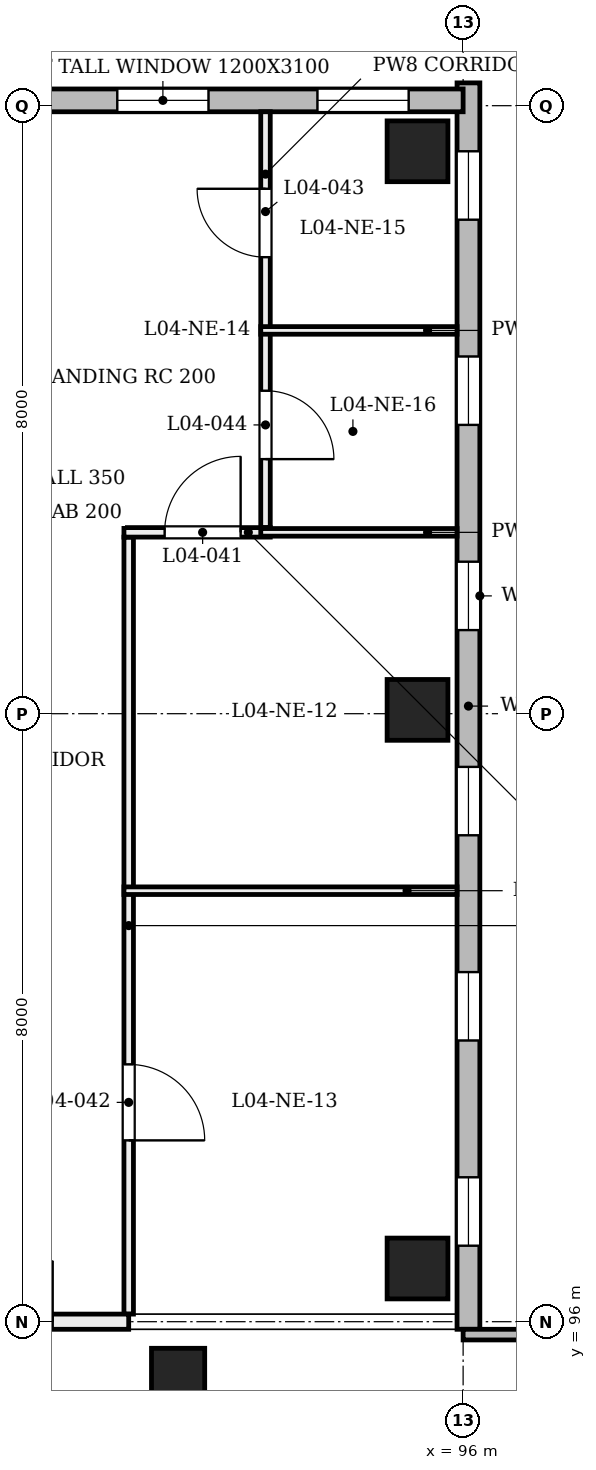
"""IFC4 building model, lengths in metres.
Left out: names, types, materials, properties, quantities, classifications, styles, units other than length and angle.
Written with IfcOpenShell. Run it as: python <this file> out.ifc"""

import sys

from ifc_helpers import new_model, si_unit, direction, frame, frame_2d, origin, origin_2d, place, context, subcontext, project, spatial, rectangle, extrude, element, fill, save


model = new_model("IFC4")
c1 = context("Model", 3, precision=1e-05, world=origin(), true_north=direction((0.0, 1.0)))
c2 = subcontext(c1, "Body", "Model", "MODEL_VIEW")
j1 = project(units=[si_unit("LENGTHUNIT", "METRE"), si_unit("PLANEANGLEUNIT", "RADIAN")], contexts=[c1])
p1 = place(None, origin())
s1 = spatial("IfcSite", under=j1, at=p1, CompositionType="ELEMENT")
p2 = place(p1, origin())
s2 = spatial("IfcBuilding", under=s1, at=p2, CompositionType="ELEMENT")
p3 = place(p2, frame((0.0, 0.0, 19.2)))
s3 = spatial("IfcBuildingStorey", under=s2, at=p3, CompositionType="ELEMENT", Elevation=19.2)
for number, where, z_axis, x_axis in (
    (1, (95.4, 96.7, 0.0), (0.0, 0.0, 1.0), (1.0, 0.0, 0.0)),
    (2, (95.4, 104.05, 0.0), (0.0, 0.0, 1.0), (1.0, 0.0, 0.0)),
    (3, (95.4, 111.4, 0.0), (0.0, 0.0, 1.0), (1.0, 0.0, 0.0)),
):
    element("IfcColumn", number, at=place(p3, frame(where, z_axis=z_axis, x_axis=x_axis)), inside=s3, PredefinedType="COLUMN", context=c2, shape_type="SweptSolid", body=[
        extrude(rectangle(XDim=0.8, YDim=0.8, at=origin_2d()), origin(), (0.0, 0.0, 1.0), 4.8),
    ])
p4 = place(p3, frame((92.0, 95.3, 0.0), z_axis=(0.203937582782, 0.0, 0.978983892783), x_axis=(0.0, 1.0, 0.0)))
e4 = element("IfcColumn", 4, at=p4, inside=s3, PredefinedType="COLUMN", context=c2, shape_type="SweptSolid", body=[
    extrude(rectangle(XDim=0.7, YDim=0.7, at=origin_2d()), origin(), (0.0, 0.0, 1.0), 4.678),
])
p5 = place(p3, frame((96.07, 95.9, 0.0), z_axis=(0.0, 0.0, 1.0), x_axis=(0.0, 1.0, 0.0)))
e5 = element("IfcWall", 5, at=p5, inside=s3, PredefinedType="SOLIDWALL", context=c2, shape_type="SweptSolid", body=[
    extrude(rectangle(XDim=16.4, YDim=0.3, at=frame_2d((8.2, 0.0))), origin(), (0.0, 0.0, 1.0), 3.9),
])
p6 = place(p5, frame((1.1, 0.0, 0.75)))
e6 = element("IfcOpeningElement", 6, at=p6, cuts=e5, PredefinedType="OPENING", context=c2, shape_type="SweptSolid", body=[
    extrude(rectangle(XDim=0.9, YDim=3.1, at=frame_2d((0.45, 1.55))), frame((0.0, 0.16, 0.0), z_axis=(0.0, -1.0, 0.0), x_axis=(1.0, 0.0, 0.0)), (0.0, 0.0, 1.0), 0.32),
])
p7 = place(p5, frame((3.8, 0.0, 0.75)))
e7 = element("IfcOpeningElement", 7, at=p7, cuts=e5, PredefinedType="OPENING", context=c2, shape_type="SweptSolid", body=[
    extrude(rectangle(XDim=0.9, YDim=3.1, at=frame_2d((0.45, 1.55))), frame((0.0, 0.16, 0.0), z_axis=(0.0, -1.0, 0.0), x_axis=(1.0, 0.0, 0.0)), (0.0, 0.0, 1.0), 0.32),
])
p8 = place(p5, frame((6.5, 0.0, 0.75)))
e8 = element("IfcOpeningElement", 8, at=p8, cuts=e5, PredefinedType="OPENING", context=c2, shape_type="SweptSolid", body=[
    extrude(rectangle(XDim=0.9, YDim=3.1, at=frame_2d((0.45, 1.55))), frame((0.0, 0.16, 0.0), z_axis=(0.0, -1.0, 0.0), x_axis=(1.0, 0.0, 0.0)), (0.0, 0.0, 1.0), 0.32),
])
p9 = place(p5, frame((9.2, 0.0, 0.75)))
e9 = element("IfcOpeningElement", 9, at=p9, cuts=e5, PredefinedType="OPENING", context=c2, shape_type="SweptSolid", body=[
    extrude(rectangle(XDim=0.9, YDim=3.1, at=frame_2d((0.45, 1.55))), frame((0.0, 0.16, 0.0), z_axis=(0.0, -1.0, 0.0), x_axis=(1.0, 0.0, 0.0)), (0.0, 0.0, 1.0), 0.32),
])
p10 = place(p5, frame((11.9, 0.0, 0.75)))
e10 = element("IfcOpeningElement", 10, at=p10, cuts=e5, PredefinedType="OPENING", context=c2, shape_type="SweptSolid", body=[
    extrude(rectangle(XDim=0.9, YDim=3.1, at=frame_2d((0.45, 1.55))), frame((0.0, 0.16, 0.0), z_axis=(0.0, -1.0, 0.0), x_axis=(1.0, 0.0, 0.0)), (0.0, 0.0, 1.0), 0.32),
])
p11 = place(p5, frame((14.6, 0.0, 0.75)))
e11 = element("IfcOpeningElement", 11, at=p11, cuts=e5, PredefinedType="OPENING", context=c2, shape_type="SweptSolid", body=[
    extrude(rectangle(XDim=0.9, YDim=3.1, at=frame_2d((0.45, 1.55))), frame((0.0, 0.16, 0.0), z_axis=(0.0, -1.0, 0.0), x_axis=(1.0, 0.0, 0.0)), (0.0, 0.0, 1.0), 0.32),
])
p12 = place(p3, frame((88.1, 112.07, 0.0), z_axis=(0.0, 0.0, 1.0), x_axis=(1.0, 0.0, 0.0)))
e12 = element("IfcWall", 12, at=p12, inside=s3, PredefinedType="SOLIDWALL", context=c2, shape_type="SweptSolid", body=[
    extrude(rectangle(XDim=7.9, YDim=0.3, at=frame_2d((3.95, 0.0))), origin(), (0.0, 0.0, 1.0), 3.9),
])
p13 = place(p12, frame((0.717, 0.0, 0.75)))
e13 = element("IfcOpeningElement", 13, at=p13, cuts=e12, PredefinedType="OPENING", context=c2, shape_type="SweptSolid", body=[
    extrude(rectangle(XDim=1.2, YDim=3.1, at=frame_2d((0.6, 1.55))), frame((0.0, 0.16, 0.0), z_axis=(0.0, -1.0, 0.0), x_axis=(1.0, 0.0, 0.0)), (0.0, 0.0, 1.0), 0.32),
])
p14 = place(p12, frame((3.35, 0.0, 0.75)))
e14 = element("IfcOpeningElement", 14, at=p14, cuts=e12, PredefinedType="OPENING", context=c2, shape_type="SweptSolid", body=[
    extrude(rectangle(XDim=1.2, YDim=3.1, at=frame_2d((0.6, 1.55))), frame((0.0, 0.16, 0.0), z_axis=(0.0, -1.0, 0.0), x_axis=(1.0, 0.0, 0.0)), (0.0, 0.0, 1.0), 0.32),
])
p15 = place(p12, frame((5.983, 0.0, 0.75)))
e15 = element("IfcOpeningElement", 15, at=p15, cuts=e12, PredefinedType="OPENING", context=c2, shape_type="SweptSolid", body=[
    extrude(rectangle(XDim=1.2, YDim=3.1, at=frame_2d((0.6, 1.55))), frame((0.0, 0.16, 0.0), z_axis=(0.0, -1.0, 0.0), x_axis=(1.0, 0.0, 0.0)), (0.0, 0.0, 1.0), 0.32),
])
p16 = place(p3, frame((96.0, 95.83, 0.0), z_axis=(0.0, 0.0, 1.0), x_axis=(1.0, 0.0, 0.0)))
e16 = element("IfcWall", 16, at=p16, inside=s3, PredefinedType="SOLIDWALL", context=c2, shape_type="SweptSolid", body=[
    extrude(rectangle(XDim=4.0, YDim=0.14, at=frame_2d((2.0, 0.0))), origin(), (0.0, 0.0, 1.0), 3.9),
])
p17 = place(p3, frame((91.6, 96.1, 0.0), z_axis=(0.0, 0.0, 1.0), x_axis=(0.0, 1.0, 0.0)))
e17 = element("IfcWall", 17, at=p17, inside=s3, PredefinedType="PARTITIONING", context=c2, shape_type="SweptSolid", body=[
    extrude(rectangle(XDim=10.223, YDim=0.125, at=frame_2d((5.112, 0.0))), origin(), (0.0, 0.0, 1.0), 3.88),
])
p18 = place(p17, frame((2.286, 0.0, 0.0)))
e18 = element("IfcOpeningElement", 18, at=p18, cuts=e17, PredefinedType="OPENING", context=c2, shape_type="SweptSolid", body=[
    extrude(rectangle(XDim=1.0, YDim=2.1, at=frame_2d((0.5, 1.05))), frame((0.0, 0.073, 0.0), z_axis=(0.0, -1.0, 0.0), x_axis=(1.0, 0.0, 0.0)), (0.0, 0.0, 1.0), 0.145),
])
p19 = place(p3, frame((93.4, 106.448, 0.0), z_axis=(0.0, 0.0, 1.0), x_axis=(0.0, 1.0, 0.0)))
e19 = element("IfcWall", 19, at=p19, inside=s3, PredefinedType="PARTITIONING", context=c2, shape_type="SweptSolid", body=[
    extrude(rectangle(XDim=5.472, YDim=0.125, at=frame_2d((2.736, 0.0))), origin(), (0.0, 0.0, 1.0), 3.88),
])
p20 = place(p19, frame((3.559, 0.0, 0.0)))
e20 = element("IfcOpeningElement", 20, at=p20, cuts=e19, PredefinedType="OPENING", context=c2, shape_type="SweptSolid", body=[
    extrude(rectangle(XDim=0.9, YDim=2.1, at=frame_2d((0.45, 1.05))), frame((0.0, 0.073, 0.0), z_axis=(0.0, -1.0, 0.0), x_axis=(1.0, 0.0, 0.0)), (0.0, 0.0, 1.0), 0.145),
])
p21 = place(p19, frame((0.901, 0.0, 0.0)))
e21 = element("IfcOpeningElement", 21, at=p21, cuts=e19, PredefinedType="OPENING", context=c2, shape_type="SweptSolid", body=[
    extrude(rectangle(XDim=0.9, YDim=2.1, at=frame_2d((0.45, 1.05))), frame((0.0, 0.073, 0.0), z_axis=(0.0, -1.0, 0.0), x_axis=(1.0, 0.0, 0.0)), (0.0, 0.0, 1.0), 0.145),
])
p22 = place(p3, frame((91.538, 101.671, 0.0), z_axis=(0.0, 0.0, 1.0), x_axis=(1.0, 0.0, 0.0)))
e22 = element("IfcWall", 22, at=p22, inside=s3, PredefinedType="PARTITIONING", context=c2, shape_type="SweptSolid", body=[
    extrude(rectangle(XDim=4.382, YDim=0.1, at=frame_2d((2.191, 0.0))), origin(), (0.0, 0.0, 1.0), 3.88),
])
p23 = place(p3, frame((91.538, 106.386, 0.0), z_axis=(0.0, 0.0, 1.0), x_axis=(1.0, 0.0, 0.0)))
e23 = element("IfcWall", 23, at=p23, inside=s3, PredefinedType="PARTITIONING", context=c2, shape_type="SweptSolid", body=[
    extrude(rectangle(XDim=1.925, YDim=0.125, at=frame_2d((0.962, 0.0))), origin(), (0.0, 0.0, 1.0), 4.56),
])
p24 = place(p23, frame((0.535, 0.0, 0.0)))
e24 = element("IfcOpeningElement", 24, at=p24, cuts=e23, PredefinedType="OPENING", context=c2, shape_type="SweptSolid", body=[
    extrude(rectangle(XDim=1.0, YDim=2.1, at=frame_2d((0.5, 1.05))), frame((0.0, 0.073, 0.0), z_axis=(0.0, -1.0, 0.0), x_axis=(1.0, 0.0, 0.0)), (0.0, 0.0, 1.0), 0.145),
])
for number, where, z_axis, x_axis in (
    (25, (93.337, 106.386, 0.0), (0.0, 0.0, 1.0), (1.0, 0.0, 0.0)),
    (26, (93.337, 109.043, 0.0), (0.0, 0.0, 1.0), (1.0, 0.0, 0.0)),
):
    element("IfcWall", number, at=place(p3, frame(where, z_axis=z_axis, x_axis=x_axis)), inside=s3, PredefinedType="PARTITIONING", context=c2, shape_type="SweptSolid", body=[
        extrude(rectangle(XDim=2.583, YDim=0.1, at=frame_2d((1.291, 0.0))), origin(), (0.0, 0.0, 1.0), 3.88),
    ])
p25 = place(p3, frame((88.0, 96.0, 0.0), z_axis=(0.0, 0.0, 1.0), x_axis=(1.0, 0.0, 0.0)))
e27 = element("IfcWall", 27, at=p25, inside=s3, PredefinedType="PARTITIONING", context=c2, shape_type="SweptSolid", body=[
    extrude(rectangle(XDim=3.6, YDim=0.2, at=frame_2d((1.8, 0.0))), origin(), (0.0, 0.0, 1.0), 3.88),
])
p26 = place(p25, frame((1.0, 0.0, 0.0)))
e28 = element("IfcOpeningElement", 28, at=p26, cuts=e27, PredefinedType="OPENING", context=c2, shape_type="SweptSolid", body=[
    extrude(rectangle(XDim=1.6, YDim=2.1, at=frame_2d((0.8, 1.05))), frame((0.0, 0.11, 0.0), z_axis=(0.0, -1.0, 0.0), x_axis=(1.0, 0.0, 0.0)), (0.0, 0.0, 1.0), 0.22),
])
p27 = place(p6, origin())
e29 = element("IfcWindow", 29, at=p27, inside=s3, PartitioningType="SINGLE_PANEL", PredefinedType="WINDOW", context=c2, shape_type="SweptSolid", body=[
    extrude(rectangle(XDim=0.9, YDim=3.1, at=frame_2d((0.45, 1.55))), frame((0.0, 0.03, 0.0), z_axis=(0.0, -1.0, 0.0), x_axis=(1.0, 0.0, 0.0)), (0.0, 0.0, 1.0), 0.06),
])
fill(e6, e29)
p28 = place(p7, origin())
e30 = element("IfcWindow", 30, at=p28, inside=s3, PartitioningType="SINGLE_PANEL", PredefinedType="WINDOW", context=c2, shape_type="SweptSolid", body=[
    extrude(rectangle(XDim=0.9, YDim=3.1, at=frame_2d((0.45, 1.55))), frame((0.0, 0.03, 0.0), z_axis=(0.0, -1.0, 0.0), x_axis=(1.0, 0.0, 0.0)), (0.0, 0.0, 1.0), 0.06),
])
fill(e7, e30)
p29 = place(p8, origin())
e31 = element("IfcWindow", 31, at=p29, inside=s3, PartitioningType="SINGLE_PANEL", PredefinedType="WINDOW", context=c2, shape_type="SweptSolid", body=[
    extrude(rectangle(XDim=0.9, YDim=3.1, at=frame_2d((0.45, 1.55))), frame((0.0, 0.03, 0.0), z_axis=(0.0, -1.0, 0.0), x_axis=(1.0, 0.0, 0.0)), (0.0, 0.0, 1.0), 0.06),
])
fill(e8, e31)
p30 = place(p9, origin())
e32 = element("IfcWindow", 32, at=p30, inside=s3, PartitioningType="SINGLE_PANEL", PredefinedType="WINDOW", context=c2, shape_type="SweptSolid", body=[
    extrude(rectangle(XDim=0.9, YDim=3.1, at=frame_2d((0.45, 1.55))), frame((0.0, 0.03, 0.0), z_axis=(0.0, -1.0, 0.0), x_axis=(1.0, 0.0, 0.0)), (0.0, 0.0, 1.0), 0.06),
])
fill(e9, e32)
p31 = place(p10, origin())
e33 = element("IfcWindow", 33, at=p31, inside=s3, PartitioningType="SINGLE_PANEL", PredefinedType="WINDOW", context=c2, shape_type="SweptSolid", body=[
    extrude(rectangle(XDim=0.9, YDim=3.1, at=frame_2d((0.45, 1.55))), frame((0.0, 0.03, 0.0), z_axis=(0.0, -1.0, 0.0), x_axis=(1.0, 0.0, 0.0)), (0.0, 0.0, 1.0), 0.06),
])
fill(e10, e33)
p32 = place(p11, origin())
e34 = element("IfcWindow", 34, at=p32, inside=s3, PartitioningType="SINGLE_PANEL", PredefinedType="WINDOW", context=c2, shape_type="SweptSolid", body=[
    extrude(rectangle(XDim=0.9, YDim=3.1, at=frame_2d((0.45, 1.55))), frame((0.0, 0.03, 0.0), z_axis=(0.0, -1.0, 0.0), x_axis=(1.0, 0.0, 0.0)), (0.0, 0.0, 1.0), 0.06),
])
fill(e11, e34)
p33 = place(p14, origin())
e35 = element("IfcWindow", 35, at=p33, inside=s3, PartitioningType="SINGLE_PANEL", PredefinedType="WINDOW", context=c2, shape_type="SweptSolid", body=[
    extrude(rectangle(XDim=1.2, YDim=3.1, at=frame_2d((0.6, 1.55))), frame((0.0, 0.03, 0.0), z_axis=(0.0, -1.0, 0.0), x_axis=(1.0, 0.0, 0.0)), (0.0, 0.0, 1.0), 0.06),
])
fill(e14, e35)
p34 = place(p15, origin())
e36 = element("IfcWindow", 36, at=p34, inside=s3, PartitioningType="SINGLE_PANEL", PredefinedType="WINDOW", context=c2, shape_type="SweptSolid", body=[
    extrude(rectangle(XDim=1.2, YDim=3.1, at=frame_2d((0.6, 1.55))), frame((0.0, 0.03, 0.0), z_axis=(0.0, -1.0, 0.0), x_axis=(1.0, 0.0, 0.0)), (0.0, 0.0, 1.0), 0.06),
])
fill(e15, e36)
p35 = place(p24, frame((1.0, 0.0, 0.0), z_axis=(0.0, 0.0, 1.0), x_axis=(-1.0, 0.0, 0.0)))
e37 = element("IfcDoor", 37, at=p35, inside=s3, OperationType="SINGLE_SWING_RIGHT", PredefinedType="DOOR", context=c2, shape_type="SweptSolid", body=[
    extrude(rectangle(XDim=1.0, YDim=2.1, at=frame_2d((0.5, 1.05))), frame((0.0, 0.025, 0.0), z_axis=(0.0, -1.0, 0.0), x_axis=(1.0, 0.0, 0.0)), (0.0, 0.0, 1.0), 0.05),
])
fill(e24, e37)
p36 = place(p18, frame((1.0, 0.0, 0.0), z_axis=(0.0, 0.0, 1.0), x_axis=(-1.0, 0.0, 0.0)))
e38 = element("IfcDoor", 38, at=p36, inside=s3, OperationType="SINGLE_SWING_LEFT", PredefinedType="DOOR", context=c2, shape_type="SweptSolid", body=[
    extrude(rectangle(XDim=1.0, YDim=2.1, at=frame_2d((0.5, 1.05))), frame((0.0, 0.025, 0.0), z_axis=(0.0, -1.0, 0.0), x_axis=(1.0, 0.0, 0.0)), (0.0, 0.0, 1.0), 0.05),
])
fill(e18, e38)
p37 = place(p20, frame((0.9, 0.0, 0.0), z_axis=(0.0, 0.0, 1.0), x_axis=(-1.0, 0.0, 0.0)))
e39 = element("IfcDoor", 39, at=p37, inside=s3, OperationType="SINGLE_SWING_RIGHT", PredefinedType="DOOR", context=c2, shape_type="SweptSolid", body=[
    extrude(rectangle(XDim=0.9, YDim=2.1, at=frame_2d((0.45, 1.05))), frame((0.0, 0.025, 0.0), z_axis=(0.0, -1.0, 0.0), x_axis=(1.0, 0.0, 0.0)), (0.0, 0.0, 1.0), 0.05),
])
fill(e20, e39)
p38 = place(p21, frame((0.9, 0.0, 0.0), z_axis=(0.0, 0.0, 1.0), x_axis=(-1.0, 0.0, 0.0)))
e40 = element("IfcDoor", 40, at=p38, inside=s3, OperationType="SINGLE_SWING_LEFT", PredefinedType="DOOR", context=c2, shape_type="SweptSolid", body=[
    extrude(rectangle(XDim=0.9, YDim=2.1, at=frame_2d((0.45, 1.05))), frame((0.0, 0.025, 0.0), z_axis=(0.0, -1.0, 0.0), x_axis=(1.0, 0.0, 0.0)), (0.0, 0.0, 1.0), 0.05),
])
fill(e21, e40)
save(model, sys.argv[1])
